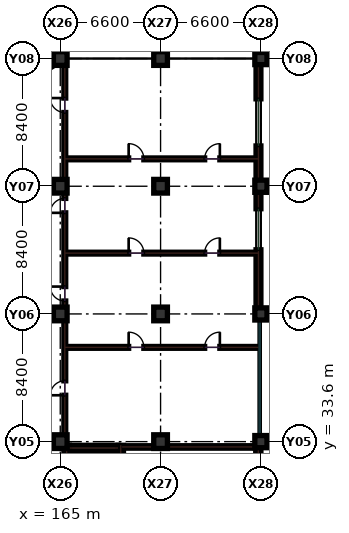
"""IFC4 building model, lengths in metres.
Left out: names, types, materials, properties, quantities, classifications, styles, units other than length and angle.
Written with IfcOpenShell. Run it as: python <this file> out.ifc"""

import sys

from ifc_helpers import new_model, si_unit, direction, frame, frame_2d, origin, origin_2d, place, context, subcontext, project, spatial, rectangle, extrude, element, fill, save


model = new_model("IFC4")
c1 = context("Model", 3, precision=1e-05, world=origin(), true_north=direction((0.0, 1.0)))
c2 = subcontext(c1, "Body", "Model", "MODEL_VIEW")
j1 = project(units=[si_unit("LENGTHUNIT", "METRE"), si_unit("PLANEANGLEUNIT", "RADIAN")], contexts=[c1])
p1 = place(None, origin())
s1 = spatial("IfcSite", under=j1, at=p1, CompositionType="ELEMENT")
p2 = place(p1, origin())
s2 = spatial("IfcBuilding", under=s1, at=p2, CompositionType="ELEMENT")
p3 = place(p2, frame((0.0, 0.0, 5.4)))
s3 = spatial("IfcBuildingStorey", under=s2, at=p3, CompositionType="ELEMENT", Elevation=5.4)
for number, where, z_axis, x_axis in (
    (1, (165.0, 33.6, 0.0), (0.0, 0.0, 1.0), (1.0, 0.0, 0.0)),
    (2, (165.0, 42.0, 0.0), (0.0, 0.0, 1.0), (1.0, 0.0, 0.0)),
    (3, (165.0, 50.4, 0.0), (0.0, 0.0, 1.0), (1.0, 0.0, 0.0)),
    (4, (165.0, 58.8, 0.0), (0.0, 0.0, 1.0), (1.0, 0.0, 0.0)),
    (5, (171.6, 33.6, 0.0), (0.0, 0.0, 1.0), (1.0, 0.0, 0.0)),
    (6, (171.6, 42.0, 0.0), (0.0, 0.0, 1.0), (1.0, 0.0, 0.0)),
    (7, (171.6, 50.4, 0.0), (0.0, 0.0, 1.0), (1.0, 0.0, 0.0)),
    (8, (171.6, 58.8, 0.0), (0.0, 0.0, 1.0), (1.0, 0.0, 0.0)),
):
    element("IfcColumn", number, at=place(p3, frame(where, z_axis=z_axis, x_axis=x_axis)), inside=s3, PredefinedType="COLUMN", context=c2, shape_type="SweptSolid", body=[
        extrude(rectangle(XDim=0.9, YDim=0.9, at=origin_2d()), origin(), (0.0, 0.0, 1.0), 4.5),
    ])
for number, where, z_axis, x_axis in (
    (9, (178.2, 33.6, 0.0), (0.0, 0.0, 1.0), (1.0, 0.0, 0.0)),
    (10, (178.2, 42.0, 0.0), (0.0, 0.0, 1.0), (1.0, 0.0, 0.0)),
    (11, (178.2, 50.4, 0.0), (0.0, 0.0, 1.0), (1.0, 0.0, 0.0)),
    (12, (178.2, 58.8, 0.0), (0.0, 0.0, 1.0), (1.0, 0.0, 0.0)),
):
    element("IfcColumn", number, at=place(p3, frame(where, z_axis=z_axis, x_axis=x_axis)), inside=s3, PredefinedType="COLUMN", context=c2, shape_type="SweptSolid", body=[
        extrude(rectangle(XDim=0.8, YDim=0.8, at=origin_2d()), origin(), (0.0, 0.0, 1.0), 4.5),
    ])
p4 = place(p3, frame((165.3, 33.65, 0.0), z_axis=(0.0, 0.0, 1.0), x_axis=(0.0, 1.0, 0.0)))
e13 = element("IfcWall", 13, at=p4, inside=s3, PredefinedType="PARTITIONING", context=c2, shape_type="SweptSolid", body=[
    extrude(rectangle(XDim=7.9, YDim=0.12, at=frame_2d((3.95, 0.0))), origin(), (0.0, 0.0, 1.0), 3.45),
])
p5 = place(p4, frame((3.0, 0.0, 0.0)))
e14 = element("IfcOpeningElement", 14, at=p5, cuts=e13, PredefinedType="OPENING", context=c2, shape_type="SweptSolid", body=[
    extrude(rectangle(XDim=0.95, YDim=2.15, at=frame_2d((0.475, 1.075))), frame((0.0, 0.07, 0.0), z_axis=(0.0, -1.0, 0.0), x_axis=(1.0, 0.0, 0.0)), (0.0, 0.0, 1.0), 0.14),
])
p6 = place(p3, frame((165.3, 42.45, 0.0), z_axis=(0.0, 0.0, 1.0), x_axis=(0.0, 1.0, 0.0)))
e15 = element("IfcWall", 15, at=p6, inside=s3, PredefinedType="PARTITIONING", context=c2, shape_type="SweptSolid", body=[
    extrude(rectangle(XDim=7.5, YDim=0.12, at=frame_2d((3.75, 0.0))), origin(), (0.0, 0.0, 1.0), 3.45),
])
p7 = place(p6, frame((0.4, 0.0, 0.0)))
e16 = element("IfcOpeningElement", 16, at=p7, cuts=e15, PredefinedType="OPENING", context=c2, shape_type="SweptSolid", body=[
    extrude(rectangle(XDim=0.95, YDim=2.15, at=frame_2d((0.475, 1.075))), frame((0.0, 0.07, 0.0), z_axis=(0.0, -1.0, 0.0), x_axis=(1.0, 0.0, 0.0)), (0.0, 0.0, 1.0), 0.14),
])
p8 = place(p6, frame((6.2, 0.0, 0.0)))
e17 = element("IfcOpeningElement", 17, at=p8, cuts=e15, PredefinedType="OPENING", context=c2, shape_type="SweptSolid", body=[
    extrude(rectangle(XDim=0.95, YDim=2.15, at=frame_2d((0.475, 1.075))), frame((0.0, 0.07, 0.0), z_axis=(0.0, -1.0, 0.0), x_axis=(1.0, 0.0, 0.0)), (0.0, 0.0, 1.0), 0.14),
])
p9 = place(p3, frame((165.3, 50.85, 0.0), z_axis=(0.0, 0.0, 1.0), x_axis=(0.0, 1.0, 0.0)))
e18 = element("IfcWall", 18, at=p9, inside=s3, PredefinedType="PARTITIONING", context=c2, shape_type="SweptSolid", body=[
    extrude(rectangle(XDim=7.65, YDim=0.12, at=frame_2d((3.825, 0.0))), origin(), (0.0, 0.0, 1.0), 3.45),
])
p10 = place(p9, frame((4.4, 0.0, 0.0)))
e19 = element("IfcOpeningElement", 19, at=p10, cuts=e18, PredefinedType="OPENING", context=c2, shape_type="SweptSolid", body=[
    extrude(rectangle(XDim=0.95, YDim=2.15, at=frame_2d((0.475, 1.075))), frame((0.0, 0.07, 0.0), z_axis=(0.0, -1.0, 0.0), x_axis=(1.0, 0.0, 0.0)), (0.0, 0.0, 1.0), 0.14),
])
p11 = place(p3, frame((165.3, 39.8, 0.0), z_axis=(0.0, 0.0, 1.0), x_axis=(1.0, 0.0, 0.0)))
e20 = element("IfcWall", 20, at=p11, inside=s3, PredefinedType="PARTITIONING", context=c2, shape_type="SweptSolid", body=[
    extrude(rectangle(XDim=12.75, YDim=0.12, at=frame_2d((6.375, 0.0))), origin(), (0.0, 0.0, 1.0), 3.45),
])
p12 = place(p11, frame((4.2, 0.0, 0.0)))
e21 = element("IfcOpeningElement", 21, at=p12, cuts=e20, PredefinedType="OPENING", context=c2, shape_type="SweptSolid", body=[
    extrude(rectangle(XDim=1.0, YDim=2.2, at=frame_2d((0.5, 1.1))), frame((0.0, 0.07, 0.0), z_axis=(0.0, -1.0, 0.0), x_axis=(1.0, 0.0, 0.0)), (0.0, 0.0, 1.0), 0.14),
])
p13 = place(p11, frame((9.2, 0.0, 0.0)))
e22 = element("IfcOpeningElement", 22, at=p13, cuts=e20, PredefinedType="OPENING", context=c2, shape_type="SweptSolid", body=[
    extrude(rectangle(XDim=1.0, YDim=2.2, at=frame_2d((0.5, 1.1))), frame((0.0, 0.07, 0.0), z_axis=(0.0, -1.0, 0.0), x_axis=(1.0, 0.0, 0.0)), (0.0, 0.0, 1.0), 0.14),
])
p14 = place(p3, frame((165.3, 46.0, 0.0), z_axis=(0.0, 0.0, 1.0), x_axis=(1.0, 0.0, 0.0)))
e23 = element("IfcWall", 23, at=p14, inside=s3, PredefinedType="PARTITIONING", context=c2, shape_type="SweptSolid", body=[
    extrude(rectangle(XDim=12.75, YDim=0.12, at=frame_2d((6.375, 0.0))), origin(), (0.0, 0.0, 1.0), 3.45),
])
p15 = place(p14, frame((4.2, 0.0, 0.0)))
e24 = element("IfcOpeningElement", 24, at=p15, cuts=e23, PredefinedType="OPENING", context=c2, shape_type="SweptSolid", body=[
    extrude(rectangle(XDim=1.0, YDim=2.2, at=frame_2d((0.5, 1.1))), frame((0.0, 0.07, 0.0), z_axis=(0.0, -1.0, 0.0), x_axis=(1.0, 0.0, 0.0)), (0.0, 0.0, 1.0), 0.14),
])
p16 = place(p14, frame((9.2, 0.0, 0.0)))
e25 = element("IfcOpeningElement", 25, at=p16, cuts=e23, PredefinedType="OPENING", context=c2, shape_type="SweptSolid", body=[
    extrude(rectangle(XDim=1.0, YDim=2.2, at=frame_2d((0.5, 1.1))), frame((0.0, 0.07, 0.0), z_axis=(0.0, -1.0, 0.0), x_axis=(1.0, 0.0, 0.0)), (0.0, 0.0, 1.0), 0.14),
])
p17 = place(p3, frame((165.3, 52.2, 0.0), z_axis=(0.0, 0.0, 1.0), x_axis=(1.0, 0.0, 0.0)))
e26 = element("IfcWall", 26, at=p17, inside=s3, PredefinedType="PARTITIONING", context=c2, shape_type="SweptSolid", body=[
    extrude(rectangle(XDim=12.75, YDim=0.12, at=frame_2d((6.375, 0.0))), origin(), (0.0, 0.0, 1.0), 3.45),
])
p18 = place(p17, frame((4.2, 0.0, 0.0)))
e27 = element("IfcOpeningElement", 27, at=p18, cuts=e26, PredefinedType="OPENING", context=c2, shape_type="SweptSolid", body=[
    extrude(rectangle(XDim=1.0, YDim=2.2, at=frame_2d((0.5, 1.1))), frame((0.0, 0.07, 0.0), z_axis=(0.0, -1.0, 0.0), x_axis=(1.0, 0.0, 0.0)), (0.0, 0.0, 1.0), 0.14),
])
p19 = place(p17, frame((9.2, 0.0, 0.0)))
e28 = element("IfcOpeningElement", 28, at=p19, cuts=e26, PredefinedType="OPENING", context=c2, shape_type="SweptSolid", body=[
    extrude(rectangle(XDim=1.0, YDim=2.2, at=frame_2d((0.5, 1.1))), frame((0.0, 0.07, 0.0), z_axis=(0.0, -1.0, 0.0), x_axis=(1.0, 0.0, 0.0)), (0.0, 0.0, 1.0), 0.14),
])
p20 = place(p3, frame((169.07, 33.25, 0.0), z_axis=(0.0, 0.0, 1.0), x_axis=(1.0, 0.0, 0.0)))
e29 = element("IfcWall", 29, at=p20, inside=s3, PredefinedType="PARTITIONING", context=c2, shape_type="SweptSolid", body=[
    extrude(rectangle(XDim=2.08, YDim=0.16, at=frame_2d((1.04, 0.0))), origin(), (0.0, 0.0, 1.0), 3.45),
])
p21 = place(p3, frame((172.05, 33.25, 0.0), z_axis=(0.0, 0.0, 1.0), x_axis=(1.0, 0.0, 0.0)))
e30 = element("IfcWall", 30, at=p21, inside=s3, PredefinedType="PARTITIONING", context=c2, shape_type="SweptSolid", body=[
    extrude(rectangle(XDim=5.95, YDim=0.16, at=frame_2d((2.975, 0.0))), origin(), (0.0, 0.0, 1.0), 3.45),
])
p22 = place(p3, frame((178.03, 25.595, 0.0), z_axis=(0.0, 0.0, 1.0), x_axis=(0.0, 1.0, 0.0)))
e31 = element("IfcWall", 31, at=p22, inside=s3, PredefinedType="SHEAR", context=c2, shape_type="SweptSolid", body=[
    extrude(rectangle(XDim=7.61, YDim=0.34, at=frame_2d((3.805, 0.0))), origin(), (0.0, 0.0, 1.0), 4.2),
])
p23 = place(p3, frame((178.04, 42.395, 0.0), z_axis=(0.0, 0.0, 1.0), x_axis=(0.0, 1.0, 0.0)))
e32 = element("IfcWall", 32, at=p23, inside=s3, PredefinedType="SOLIDWALL", context=c2, shape_type="SweptSolid", body=[
    extrude(rectangle(XDim=7.61, YDim=0.32, at=frame_2d((3.805, 0.0))), origin(), (0.0, 0.0, 1.0), 3.635),
])
p24 = place(p23, frame((3.825, 0.0, 0.95)))
e33 = element("IfcOpeningElement", 33, at=p24, cuts=e32, PredefinedType="OPENING", context=c2, shape_type="SweptSolid", body=[
    extrude(rectangle(XDim=2.7, YDim=2.05, at=frame_2d((1.35, 1.025))), frame((0.0, 0.17, 0.0), z_axis=(0.0, -1.0, 0.0), x_axis=(1.0, 0.0, 0.0)), (0.0, 0.0, 1.0), 0.34),
])
p25 = place(p3, frame((178.04, 50.795, 0.0), z_axis=(0.0, 0.0, 1.0), x_axis=(0.0, 1.0, 0.0)))
e34 = element("IfcWall", 34, at=p25, inside=s3, PredefinedType="SOLIDWALL", context=c2, shape_type="SweptSolid", body=[
    extrude(rectangle(XDim=7.61, YDim=0.32, at=frame_2d((3.805, 0.0))), origin(), (0.0, 0.0, 1.0), 3.485),
])
p26 = place(p25, frame((2.255, 0.0, 0.95)))
e35 = element("IfcOpeningElement", 35, at=p26, cuts=e34, PredefinedType="OPENING", context=c2, shape_type="SweptSolid", body=[
    extrude(rectangle(XDim=3.1, YDim=2.05, at=frame_2d((1.55, 1.025))), frame((0.0, 0.17, 0.0), z_axis=(0.0, -1.0, 0.0), x_axis=(1.0, 0.0, 0.0)), (0.0, 0.0, 1.0), 0.34),
])
p27 = place(p3, frame((178.04, 59.195, 0.0), z_axis=(0.0, 0.0, 1.0), x_axis=(0.0, 1.0, 0.0)))
e36 = element("IfcWall", 36, at=p27, inside=s3, PredefinedType="SOLIDWALL", context=c2, shape_type="SweptSolid", body=[
    extrude(rectangle(XDim=7.76, YDim=0.32, at=frame_2d((3.88, 0.0))), origin(), (0.0, 0.0, 1.0), 3.635),
])
p28 = place(p27, frame((0.65, 0.0, 0.95)))
e37 = element("IfcOpeningElement", 37, at=p28, cuts=e36, PredefinedType="OPENING", context=c2, shape_type="SweptSolid", body=[
    extrude(rectangle(XDim=1.2, YDim=1.5, at=frame_2d((0.6, 0.75))), frame((0.0, 0.17, 0.0), z_axis=(0.0, -1.0, 0.0), x_axis=(1.0, 0.0, 0.0)), (0.0, 0.0, 1.0), 0.34),
])
p29 = place(p27, frame((5.91, 0.0, 0.95)))
e38 = element("IfcOpeningElement", 38, at=p29, cuts=e36, PredefinedType="OPENING", context=c2, shape_type="SweptSolid", body=[
    extrude(rectangle(XDim=1.2, YDim=1.5, at=frame_2d((0.6, 0.75))), frame((0.0, 0.17, 0.0), z_axis=(0.0, -1.0, 0.0), x_axis=(1.0, 0.0, 0.0)), (0.0, 0.0, 1.0), 0.34),
])
p30 = place(p3, frame((158.65, 54.76, 0.0), z_axis=(0.0, 0.0, 1.0), x_axis=(0.843786613851, 0.536678814829, 0.0)))
e39 = element("IfcWall", 39, at=p30, inside=s3, PredefinedType="SHEAR", context=c2, shape_type="SweptSolid", body=[
    extrude(rectangle(XDim=7.229, YDim=0.34, at=frame_2d((3.615, 0.0))), origin(), (0.0, 0.0, 1.0), 4.2),
])
p31 = place(p3, frame((165.42, 25.19, 0.0), z_axis=(0.0, 0.0, 1.0), x_axis=(0.0, 1.0, 0.0)))
e40 = element("IfcWall", 40, at=p31, inside=s3, PredefinedType="SHEAR", context=c2, shape_type="SweptSolid", body=[
    extrude(rectangle(XDim=8.17, YDim=0.36, at=frame_2d((4.085, 0.0))), origin(), (0.0, 0.0, 1.0), 4.2),
])
p32 = place(p3, frame((168.98, 25.19, 0.0), z_axis=(0.0, 0.0, 1.0), x_axis=(0.0, 1.0, 0.0)))
e41 = element("IfcWall", 41, at=p32, inside=s3, PredefinedType="SHEAR", context=c2, shape_type="SweptSolid", body=[
    extrude(rectangle(XDim=8.17, YDim=0.36, at=frame_2d((4.085, 0.0))), origin(), (0.0, 0.0, 1.0), 4.2),
])
p33 = place(p32, frame((0.45, 0.0, 0.0)))
e42 = element("IfcOpeningElement", 42, at=p33, cuts=e41, PredefinedType="OPENING", context=c2, shape_type="SweptSolid", body=[
    extrude(rectangle(XDim=1.25, YDim=2.15, at=frame_2d((0.625, 1.075))), frame((0.0, 0.19, 0.0), z_axis=(0.0, -1.0, 0.0), x_axis=(1.0, 0.0, 0.0)), (0.0, 0.0, 1.0), 0.38),
])
p34 = place(p3, frame((165.6, 33.18, 0.0), z_axis=(0.0, 0.0, 1.0), x_axis=(1.0, 0.0, 0.0)))
e43 = element("IfcWall", 43, at=p34, inside=s3, PredefinedType="SHEAR", context=c2, shape_type="SweptSolid", body=[
    extrude(rectangle(XDim=3.2, YDim=0.36, at=frame_2d((1.6, 0.0))), origin(), (0.0, 0.0, 1.0), 4.2),
])
p35 = place(p5, origin())
e44 = element("IfcDoor", 44, at=p35, inside=s3, OperationType="SINGLE_SWING_LEFT", PredefinedType="DOOR", context=c2, shape_type="SweptSolid", body=[
    extrude(rectangle(XDim=0.95, YDim=2.15, at=frame_2d((0.475, 1.075))), frame((0.0, 0.025, 0.0), z_axis=(0.0, -1.0, 0.0), x_axis=(1.0, 0.0, 0.0)), (0.0, 0.0, 1.0), 0.05),
])
fill(e14, e44)
p36 = place(p7, origin())
e45 = element("IfcDoor", 45, at=p36, inside=s3, OperationType="SINGLE_SWING_RIGHT", PredefinedType="DOOR", context=c2, shape_type="SweptSolid", body=[
    extrude(rectangle(XDim=0.95, YDim=2.15, at=frame_2d((0.475, 1.075))), frame((0.0, 0.025, 0.0), z_axis=(0.0, -1.0, 0.0), x_axis=(1.0, 0.0, 0.0)), (0.0, 0.0, 1.0), 0.05),
])
fill(e16, e45)
p37 = place(p8, origin())
e46 = element("IfcDoor", 46, at=p37, inside=s3, OperationType="SINGLE_SWING_LEFT", PredefinedType="DOOR", context=c2, shape_type="SweptSolid", body=[
    extrude(rectangle(XDim=0.95, YDim=2.15, at=frame_2d((0.475, 1.075))), frame((0.0, 0.025, 0.0), z_axis=(0.0, -1.0, 0.0), x_axis=(1.0, 0.0, 0.0)), (0.0, 0.0, 1.0), 0.05),
])
fill(e17, e46)
p38 = place(p10, origin())
e47 = element("IfcDoor", 47, at=p38, inside=s3, OperationType="SINGLE_SWING_RIGHT", PredefinedType="DOOR", context=c2, shape_type="SweptSolid", body=[
    extrude(rectangle(XDim=0.95, YDim=2.15, at=frame_2d((0.475, 1.075))), frame((0.0, 0.025, 0.0), z_axis=(0.0, -1.0, 0.0), x_axis=(1.0, 0.0, 0.0)), (0.0, 0.0, 1.0), 0.05),
])
fill(e19, e47)
p39 = place(p12, origin())
e48 = element("IfcDoor", 48, at=p39, inside=s3, OperationType="SINGLE_SWING_LEFT", PredefinedType="DOOR", context=c2, shape_type="SweptSolid", body=[
    extrude(rectangle(XDim=1.0, YDim=2.2, at=frame_2d((0.5, 1.1))), frame((0.0, 0.025, 0.0), z_axis=(0.0, -1.0, 0.0), x_axis=(1.0, 0.0, 0.0)), (0.0, 0.0, 1.0), 0.05),
])
fill(e21, e48)
p40 = place(p13, origin())
e49 = element("IfcDoor", 49, at=p40, inside=s3, OperationType="SINGLE_SWING_RIGHT", PredefinedType="DOOR", context=c2, shape_type="SweptSolid", body=[
    extrude(rectangle(XDim=1.0, YDim=2.2, at=frame_2d((0.5, 1.1))), frame((0.0, 0.025, 0.0), z_axis=(0.0, -1.0, 0.0), x_axis=(1.0, 0.0, 0.0)), (0.0, 0.0, 1.0), 0.05),
])
fill(e22, e49)
p41 = place(p15, origin())
e50 = element("IfcDoor", 50, at=p41, inside=s3, OperationType="SINGLE_SWING_LEFT", PredefinedType="DOOR", context=c2, shape_type="SweptSolid", body=[
    extrude(rectangle(XDim=1.0, YDim=2.2, at=frame_2d((0.5, 1.1))), frame((0.0, 0.025, 0.0), z_axis=(0.0, -1.0, 0.0), x_axis=(1.0, 0.0, 0.0)), (0.0, 0.0, 1.0), 0.05),
])
fill(e24, e50)
p42 = place(p16, origin())
e51 = element("IfcDoor", 51, at=p42, inside=s3, OperationType="SINGLE_SWING_RIGHT", PredefinedType="DOOR", context=c2, shape_type="SweptSolid", body=[
    extrude(rectangle(XDim=1.0, YDim=2.2, at=frame_2d((0.5, 1.1))), frame((0.0, 0.025, 0.0), z_axis=(0.0, -1.0, 0.0), x_axis=(1.0, 0.0, 0.0)), (0.0, 0.0, 1.0), 0.05),
])
fill(e25, e51)
p43 = place(p18, origin())
e52 = element("IfcDoor", 52, at=p43, inside=s3, OperationType="SINGLE_SWING_LEFT", PredefinedType="DOOR", context=c2, shape_type="SweptSolid", body=[
    extrude(rectangle(XDim=1.0, YDim=2.2, at=frame_2d((0.5, 1.1))), frame((0.0, 0.025, 0.0), z_axis=(0.0, -1.0, 0.0), x_axis=(1.0, 0.0, 0.0)), (0.0, 0.0, 1.0), 0.05),
])
fill(e27, e52)
p44 = place(p19, origin())
e53 = element("IfcDoor", 53, at=p44, inside=s3, OperationType="SINGLE_SWING_RIGHT", PredefinedType="DOOR", context=c2, shape_type="SweptSolid", body=[
    extrude(rectangle(XDim=1.0, YDim=2.2, at=frame_2d((0.5, 1.1))), frame((0.0, 0.025, 0.0), z_axis=(0.0, -1.0, 0.0), x_axis=(1.0, 0.0, 0.0)), (0.0, 0.0, 1.0), 0.05),
])
fill(e28, e53)
p45 = place(p24, origin())
e54 = element("IfcWindow", 54, at=p45, inside=s3, PartitioningType="SINGLE_PANEL", PredefinedType="WINDOW", context=c2, shape_type="SweptSolid", body=[
    extrude(rectangle(XDim=2.7, YDim=2.05, at=frame_2d((1.35, 1.025))), frame((0.0, 0.03, 0.0), z_axis=(0.0, -1.0, 0.0), x_axis=(1.0, 0.0, 0.0)), (0.0, 0.0, 1.0), 0.06),
])
fill(e33, e54)
p46 = place(p26, origin())
e55 = element("IfcWindow", 55, at=p46, inside=s3, PartitioningType="SINGLE_PANEL", PredefinedType="WINDOW", context=c2, shape_type="SweptSolid", body=[
    extrude(rectangle(XDim=3.1, YDim=2.05, at=frame_2d((1.55, 1.025))), frame((0.0, 0.03, 0.0), z_axis=(0.0, -1.0, 0.0), x_axis=(1.0, 0.0, 0.0)), (0.0, 0.0, 1.0), 0.06),
])
fill(e35, e55)
save(model, sys.argv[1])
